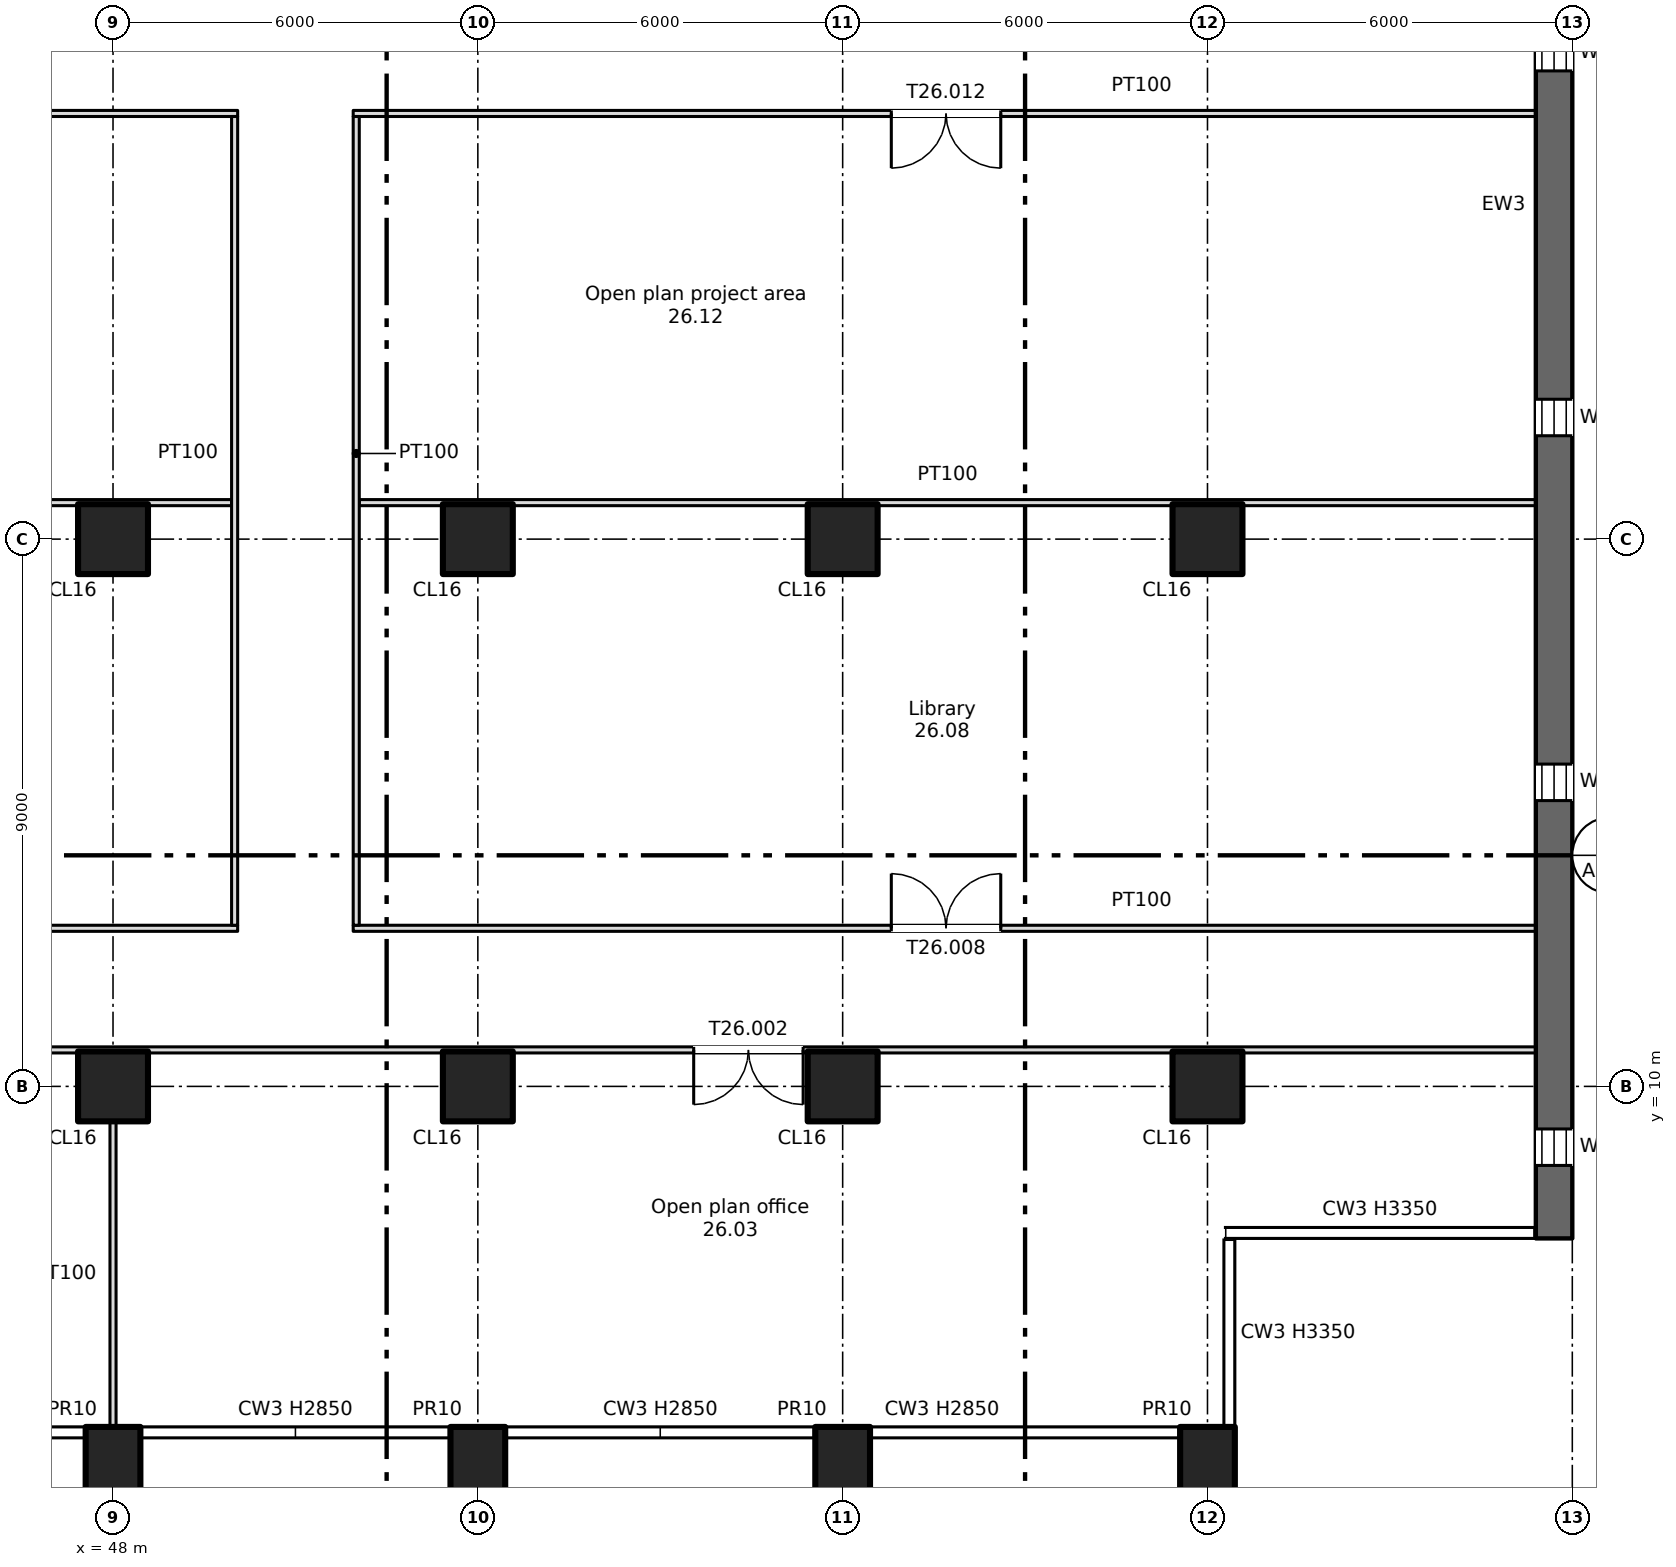
"""IFC4 building model, lengths in metres.
Left out: names, types, materials, properties, quantities, classifications, styles, units other than length and angle.
Written with IfcOpenShell. Run it as: python <this file> out.ifc"""

import sys

from ifc_helpers import new_model, si_unit, direction, frame, frame_2d, origin, origin_2d, place, context, subcontext, project, spatial, rectangle, extrude, element, fill, save


model = new_model("IFC4")
c1 = context("Model", 3, precision=1e-05, world=origin(), true_north=direction((0.0, 1.0)))
c2 = subcontext(c1, "Body", "Model", "MODEL_VIEW")
j1 = project(units=[si_unit("LENGTHUNIT", "METRE"), si_unit("PLANEANGLEUNIT", "RADIAN")], contexts=[c1])
p1 = place(None, origin())
s1 = spatial("IfcSite", under=j1, at=p1, CompositionType="ELEMENT")
p2 = place(p1, origin())
s2 = spatial("IfcBuilding", under=s1, at=p2, CompositionType="ELEMENT")
p3 = place(p2, frame((0.0, 0.0, 178.0)))
s3 = spatial("IfcBuildingStorey", under=s2, at=p3, CompositionType="ELEMENT", Elevation=178.0)
for number, where, z_axis, x_axis in (
    (1, (48.0, 3.7, -0.4), (0.0, 0.0, 1.0), (1.0, 0.0, 0.0)),
    (2, (54.0, 3.7, -0.4), (0.0, 0.0, 1.0), (1.0, 0.0, 0.0)),
    (3, (60.0, 3.7, -0.4), (0.0, 0.0, 1.0), (1.0, 0.0, 0.0)),
    (4, (66.0, 3.7, -0.4), (0.0, 0.0, 1.0), (1.0, 0.0, 0.0)),
):
    element("IfcColumn", number, at=place(p3, frame(where, z_axis=z_axis, x_axis=x_axis)), inside=s3, PredefinedType="COLUMN", context=c2, shape_type="SweptSolid", body=[
        extrude(rectangle(XDim=0.9, YDim=1.4, at=origin_2d()), origin(), (0.0, 0.0, 1.0), 3.75),
    ])
for number, where, z_axis, x_axis in (
    (5, (48.0, 10.0, 0.0), (0.0, 0.0, 1.0), (1.0, 0.0, 0.0)),
    (6, (48.0, 19.0, 0.0), (0.0, 0.0, 1.0), (1.0, 0.0, 0.0)),
    (7, (54.0, 10.0, 0.0), (0.0, 0.0, 1.0), (1.0, 0.0, 0.0)),
    (8, (54.0, 19.0, 0.0), (0.0, 0.0, 1.0), (1.0, 0.0, 0.0)),
    (9, (60.0, 10.0, 0.0), (0.0, 0.0, 1.0), (1.0, 0.0, 0.0)),
    (10, (60.0, 19.0, 0.0), (0.0, 0.0, 1.0), (1.0, 0.0, 0.0)),
    (11, (66.0, 10.0, 0.0), (0.0, 0.0, 1.0), (1.0, 0.0, 0.0)),
    (12, (66.0, 19.0, 0.0), (0.0, 0.0, 1.0), (1.0, 0.0, 0.0)),
):
    element("IfcColumn", number, at=place(p3, frame(where, z_axis=z_axis, x_axis=x_axis)), inside=s3, PredefinedType="COLUMN", context=c2, shape_type="SweptSolid", body=[
        extrude(rectangle(XDim=1.15, YDim=1.15, at=origin_2d()), origin(), (0.0, 0.0, 1.0), 3.35),
    ])
p4 = place(p3, frame((71.7, 7.5, 0.0), z_axis=(0.0, 0.0, 1.0), x_axis=(0.0, 1.0, 0.0)))
e13 = element("IfcWall", 13, at=p4, inside=s3, PredefinedType="SHEAR", context=c2, shape_type="SweptSolid", body=[
    extrude(rectangle(XDim=34.0, YDim=0.6, at=frame_2d((17.0, 0.0))), origin(), (0.0, 0.0, 1.0), 3.35),
])
p5 = place(p4, frame((1.2, 0.0, 0.6)))
e14 = element("IfcOpeningElement", 14, at=p5, cuts=e13, PredefinedType="OPENING", context=c2, shape_type="SweptSolid", body=[
    extrude(rectangle(XDim=0.6, YDim=2.4, at=frame_2d((0.3, 1.2))), frame((0.0, 0.31, 0.0), z_axis=(0.0, -1.0, 0.0), x_axis=(1.0, 0.0, 0.0)), (0.0, 0.0, 1.0), 0.62),
])
p6 = place(p4, frame((7.2, 0.0, 0.6)))
e15 = element("IfcOpeningElement", 15, at=p6, cuts=e13, PredefinedType="OPENING", context=c2, shape_type="SweptSolid", body=[
    extrude(rectangle(XDim=0.6, YDim=2.4, at=frame_2d((0.3, 1.2))), frame((0.0, 0.31, 0.0), z_axis=(0.0, -1.0, 0.0), x_axis=(1.0, 0.0, 0.0)), (0.0, 0.0, 1.0), 0.62),
])
p7 = place(p4, frame((13.2, 0.0, 0.6)))
e16 = element("IfcOpeningElement", 16, at=p7, cuts=e13, PredefinedType="OPENING", context=c2, shape_type="SweptSolid", body=[
    extrude(rectangle(XDim=0.6, YDim=2.4, at=frame_2d((0.3, 1.2))), frame((0.0, 0.31, 0.0), z_axis=(0.0, -1.0, 0.0), x_axis=(1.0, 0.0, 0.0)), (0.0, 0.0, 1.0), 0.62),
])
p8 = place(p4, frame((19.2, 0.0, 0.6)))
e17 = element("IfcOpeningElement", 17, at=p8, cuts=e13, PredefinedType="OPENING", context=c2, shape_type="SweptSolid", body=[
    extrude(rectangle(XDim=0.6, YDim=2.4, at=frame_2d((0.3, 1.2))), frame((0.0, 0.31, 0.0), z_axis=(0.0, -1.0, 0.0), x_axis=(1.0, 0.0, 0.0)), (0.0, 0.0, 1.0), 0.62),
])
p9 = place(p3, frame((6.6, 10.6, 0.0), z_axis=(0.0, 0.0, 1.0), x_axis=(1.0, 0.0, 0.0)))
e18 = element("IfcWall", 18, at=p9, inside=s3, PredefinedType="PARTITIONING", context=c2, shape_type="SweptSolid", body=[
    extrude(rectangle(XDim=64.8, YDim=0.1, at=frame_2d((32.4, 0.0))), origin(), (0.0, 0.0, 1.0), 3.35),
])
p10 = place(p9, frame((30.0, 0.0, 0.0)))
e19 = element("IfcOpeningElement", 19, at=p10, cuts=e18, PredefinedType="OPENING", context=c2, shape_type="SweptSolid", body=[
    extrude(rectangle(XDim=1.8, YDim=2.1, at=frame_2d((0.9, 1.05))), frame((0.0, 0.06, 0.0), z_axis=(0.0, -1.0, 0.0), x_axis=(1.0, 0.0, 0.0)), (0.0, 0.0, 1.0), 0.12),
])
p11 = place(p9, frame((50.95, 0.0, 0.0)))
e20 = element("IfcOpeningElement", 20, at=p11, cuts=e18, PredefinedType="OPENING", context=c2, shape_type="SweptSolid", body=[
    extrude(rectangle(XDim=1.8, YDim=2.1, at=frame_2d((0.9, 1.05))), frame((0.0, 0.06, 0.0), z_axis=(0.0, -1.0, 0.0), x_axis=(1.0, 0.0, 0.0)), (0.0, 0.0, 1.0), 0.12),
])
p12 = place(p9, frame((7.8, 0.0, 0.0)))
e21 = element("IfcOpeningElement", 21, at=p12, cuts=e18, PredefinedType="OPENING", context=c2, shape_type="SweptSolid", body=[
    extrude(rectangle(XDim=1.8, YDim=2.1, at=frame_2d((0.9, 1.05))), frame((0.0, 0.06, 0.0), z_axis=(0.0, -1.0, 0.0), x_axis=(1.0, 0.0, 0.0)), (0.0, 0.0, 1.0), 0.12),
])
p13 = place(p3, frame((27.95, 12.6, 0.0), z_axis=(0.0, 0.0, 1.0), x_axis=(1.0, 0.0, 0.0)))
e22 = element("IfcWall", 22, at=p13, inside=s3, PredefinedType="PARTITIONING", context=c2, shape_type="SweptSolid", body=[
    extrude(rectangle(XDim=22.1, YDim=0.1, at=frame_2d((11.05, 0.0))), origin(), (0.0, 0.0, 1.0), 3.35),
])
p14 = place(p13, frame((4.95, 0.0, 0.0)))
e23 = element("IfcOpeningElement", 23, at=p14, cuts=e22, PredefinedType="OPENING", context=c2, shape_type="SweptSolid", body=[
    extrude(rectangle(XDim=1.2, YDim=2.1, at=frame_2d((0.6, 1.05))), frame((0.0, 0.06, 0.0), z_axis=(0.0, -1.0, 0.0), x_axis=(1.0, 0.0, 0.0)), (0.0, 0.0, 1.0), 0.12),
])
p15 = place(p13, frame((15.95, 0.0, 0.0)))
e24 = element("IfcOpeningElement", 24, at=p15, cuts=e22, PredefinedType="OPENING", context=c2, shape_type="SweptSolid", body=[
    extrude(rectangle(XDim=1.2, YDim=2.1, at=frame_2d((0.6, 1.05))), frame((0.0, 0.06, 0.0), z_axis=(0.0, -1.0, 0.0), x_axis=(1.0, 0.0, 0.0)), (0.0, 0.0, 1.0), 0.12),
])
p16 = place(p3, frame((51.95, 12.6, 0.0), z_axis=(0.0, 0.0, 1.0), x_axis=(1.0, 0.0, 0.0)))
e25 = element("IfcWall", 25, at=p16, inside=s3, PredefinedType="PARTITIONING", context=c2, shape_type="SweptSolid", body=[
    extrude(rectangle(XDim=19.45, YDim=0.1, at=frame_2d((9.725, 0.0))), origin(), (0.0, 0.0, 1.0), 3.35),
])
p17 = place(p16, frame((8.85, 0.0, 0.0)))
e26 = element("IfcOpeningElement", 26, at=p17, cuts=e25, PredefinedType="OPENING", context=c2, shape_type="SweptSolid", body=[
    extrude(rectangle(XDim=1.8, YDim=2.1, at=frame_2d((0.9, 1.05))), frame((0.0, 0.06, 0.0), z_axis=(0.0, -1.0, 0.0), x_axis=(1.0, 0.0, 0.0)), (0.0, 0.0, 1.0), 0.12),
])
p18 = place(p3, frame((28.05, 19.6, 0.0), z_axis=(0.0, 0.0, 1.0), x_axis=(1.0, 0.0, 0.0)))
e27 = element("IfcWall", 27, at=p18, inside=s3, PredefinedType="PARTITIONING", context=c2, shape_type="SweptSolid", body=[
    extrude(rectangle(XDim=21.9, YDim=0.1, at=frame_2d((10.95, 0.0))), origin(), (0.0, 0.0, 1.0), 3.35),
])
p19 = place(p3, frame((52.05, 19.6, 0.0), z_axis=(0.0, 0.0, 1.0), x_axis=(1.0, 0.0, 0.0)))
e28 = element("IfcWall", 28, at=p19, inside=s3, PredefinedType="PARTITIONING", context=c2, shape_type="SweptSolid", body=[
    extrude(rectangle(XDim=19.35, YDim=0.1, at=frame_2d((9.675, 0.0))), origin(), (0.0, 0.0, 1.0), 3.35),
])
p20 = place(p3, frame((27.95, 26.0, 0.0), z_axis=(0.0, 0.0, 1.0), x_axis=(1.0, 0.0, 0.0)))
e29 = element("IfcWall", 29, at=p20, inside=s3, PredefinedType="PARTITIONING", context=c2, shape_type="SweptSolid", body=[
    extrude(rectangle(XDim=22.1, YDim=0.1, at=frame_2d((11.05, 0.0))), origin(), (0.0, 0.0, 1.0), 3.35),
])
p21 = place(p20, frame((10.15, 0.0, 0.0)))
e30 = element("IfcOpeningElement", 30, at=p21, cuts=e29, PredefinedType="OPENING", context=c2, shape_type="SweptSolid", body=[
    extrude(rectangle(XDim=1.8, YDim=2.1, at=frame_2d((0.9, 1.05))), frame((0.0, 0.06, 0.0), z_axis=(0.0, -1.0, 0.0), x_axis=(1.0, 0.0, 0.0)), (0.0, 0.0, 1.0), 0.12),
])
p22 = place(p3, frame((51.95, 26.0, 0.0), z_axis=(0.0, 0.0, 1.0), x_axis=(1.0, 0.0, 0.0)))
e31 = element("IfcWall", 31, at=p22, inside=s3, PredefinedType="PARTITIONING", context=c2, shape_type="SweptSolid", body=[
    extrude(rectangle(XDim=19.45, YDim=0.1, at=frame_2d((9.725, 0.0))), origin(), (0.0, 0.0, 1.0), 3.35),
])
p23 = place(p22, frame((8.85, 0.0, 0.0)))
e32 = element("IfcOpeningElement", 32, at=p23, cuts=e31, PredefinedType="OPENING", context=c2, shape_type="SweptSolid", body=[
    extrude(rectangle(XDim=1.8, YDim=2.1, at=frame_2d((0.9, 1.05))), frame((0.0, 0.06, 0.0), z_axis=(0.0, -1.0, 0.0), x_axis=(1.0, 0.0, 0.0)), (0.0, 0.0, 1.0), 0.12),
])
p24 = place(p3, frame((48.0, 4.4, 0.0), z_axis=(0.0, 0.0, 1.0), x_axis=(0.0, 1.0, 0.0)))
e33 = element("IfcWall", 33, at=p24, inside=s3, PredefinedType="PARTITIONING", context=c2, shape_type="SweptSolid", body=[
    extrude(rectangle(XDim=5.025, YDim=0.1, at=frame_2d((2.513, 0.0))), origin(), (0.0, 0.0, 1.0), 3.35),
])
for number, where, z_axis, x_axis in (
    (34, (50.0, 12.65, 0.0), (0.0, 0.0, 1.0), (0.0, 1.0, 0.0)),
    (35, (52.0, 12.65, 0.0), (0.0, 0.0, 1.0), (0.0, 1.0, 0.0)),
):
    element("IfcWall", number, at=place(p3, frame(where, z_axis=z_axis, x_axis=x_axis)), inside=s3, PredefinedType="PARTITIONING", context=c2, shape_type="SweptSolid", body=[
        extrude(rectangle(XDim=13.3, YDim=0.1, at=frame_2d((6.65, 0.0))), origin(), (0.0, 0.0, 1.0), 3.35),
    ])
p25 = place(p5, origin())
e36 = element("IfcWindow", 36, at=p25, inside=s3, PartitioningType="SINGLE_PANEL", PredefinedType="WINDOW", context=c2, shape_type="SweptSolid", body=[
    extrude(rectangle(XDim=0.6, YDim=2.4, at=frame_2d((0.3, 1.2))), frame((0.0, 0.03, 0.0), z_axis=(0.0, -1.0, 0.0), x_axis=(1.0, 0.0, 0.0)), (0.0, 0.0, 1.0), 0.06),
])
fill(e14, e36)
p26 = place(p6, origin())
e37 = element("IfcWindow", 37, at=p26, inside=s3, PartitioningType="SINGLE_PANEL", PredefinedType="WINDOW", context=c2, shape_type="SweptSolid", body=[
    extrude(rectangle(XDim=0.6, YDim=2.4, at=frame_2d((0.3, 1.2))), frame((0.0, 0.03, 0.0), z_axis=(0.0, -1.0, 0.0), x_axis=(1.0, 0.0, 0.0)), (0.0, 0.0, 1.0), 0.06),
])
fill(e15, e37)
p27 = place(p7, origin())
e38 = element("IfcWindow", 38, at=p27, inside=s3, PartitioningType="SINGLE_PANEL", PredefinedType="WINDOW", context=c2, shape_type="SweptSolid", body=[
    extrude(rectangle(XDim=0.6, YDim=2.4, at=frame_2d((0.3, 1.2))), frame((0.0, 0.03, 0.0), z_axis=(0.0, -1.0, 0.0), x_axis=(1.0, 0.0, 0.0)), (0.0, 0.0, 1.0), 0.06),
])
fill(e16, e38)
p28 = place(p8, origin())
e39 = element("IfcWindow", 39, at=p28, inside=s3, PartitioningType="SINGLE_PANEL", PredefinedType="WINDOW", context=c2, shape_type="SweptSolid", body=[
    extrude(rectangle(XDim=0.6, YDim=2.4, at=frame_2d((0.3, 1.2))), frame((0.0, 0.03, 0.0), z_axis=(0.0, -1.0, 0.0), x_axis=(1.0, 0.0, 0.0)), (0.0, 0.0, 1.0), 0.06),
])
fill(e17, e39)
p29 = place(p11, origin())
e40 = element("IfcDoor", 40, at=p29, inside=s3, OperationType="DOUBLE_DOOR_SINGLE_SWING", PredefinedType="DOOR", context=c2, shape_type="SweptSolid", body=[
    extrude(rectangle(XDim=1.8, YDim=2.1, at=frame_2d((0.9, 1.05))), frame((0.0, 0.025, 0.0), z_axis=(0.0, -1.0, 0.0), x_axis=(1.0, 0.0, 0.0)), (0.0, 0.0, 1.0), 0.05),
])
fill(e20, e40)
p30 = place(p17, origin())
e41 = element("IfcDoor", 41, at=p30, inside=s3, OperationType="DOUBLE_DOOR_SINGLE_SWING", PredefinedType="DOOR", context=c2, shape_type="SweptSolid", body=[
    extrude(rectangle(XDim=1.8, YDim=2.1, at=frame_2d((0.9, 1.05))), frame((0.0, 0.025, 0.0), z_axis=(0.0, -1.0, 0.0), x_axis=(1.0, 0.0, 0.0)), (0.0, 0.0, 1.0), 0.05),
])
fill(e26, e41)
p31 = place(p23, origin())
e42 = element("IfcDoor", 42, at=p31, inside=s3, OperationType="DOUBLE_DOOR_SINGLE_SWING", PredefinedType="DOOR", context=c2, shape_type="SweptSolid", body=[
    extrude(rectangle(XDim=1.8, YDim=2.1, at=frame_2d((0.9, 1.05))), frame((0.0, 0.025, 0.0), z_axis=(0.0, -1.0, 0.0), x_axis=(1.0, 0.0, 0.0)), (0.0, 0.0, 1.0), 0.05),
])
fill(e32, e42)
save(model, sys.argv[1])
